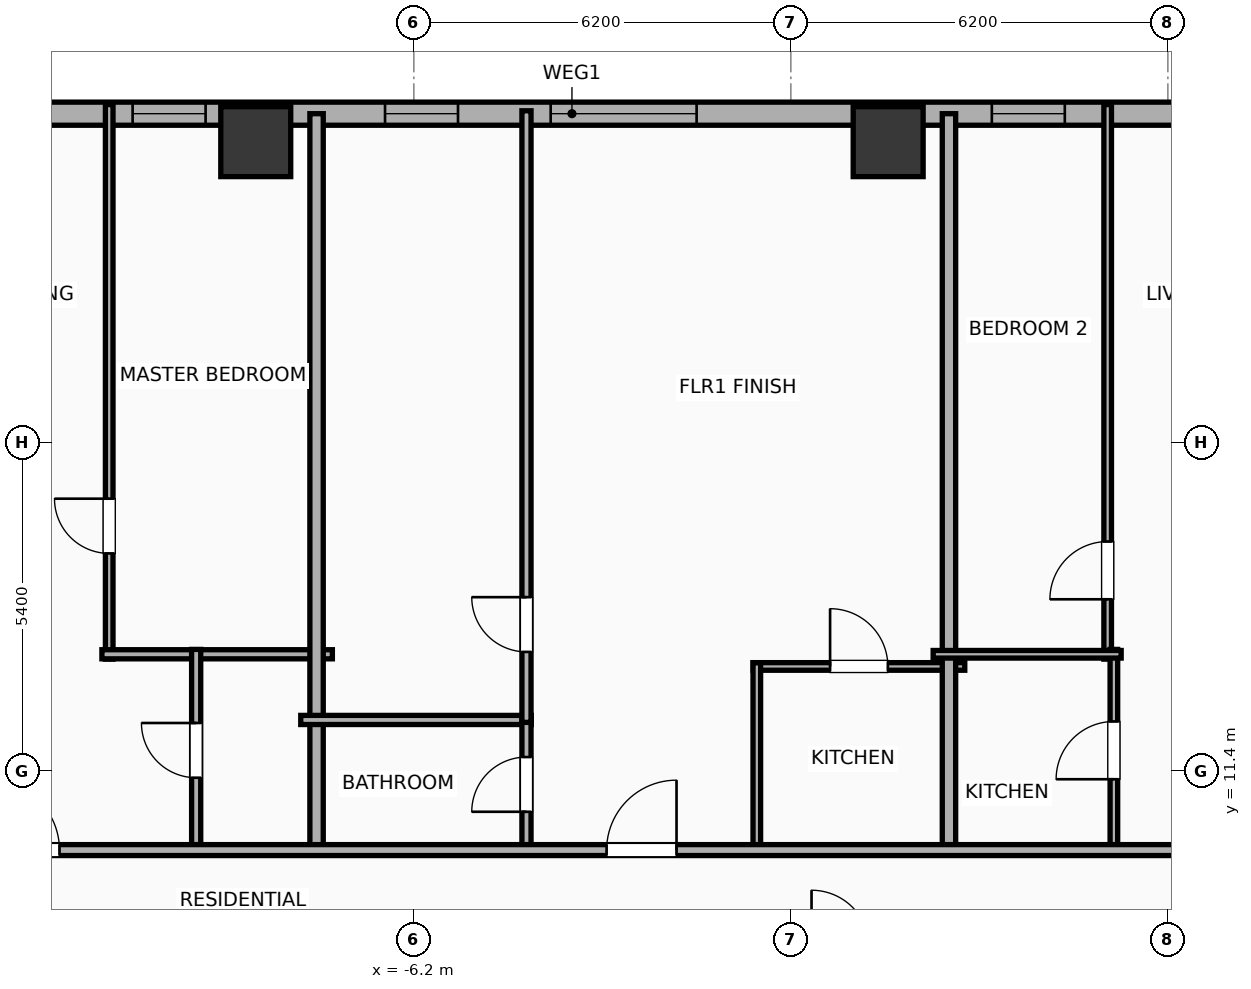
"""IFC4 building model, lengths in metres.
Left out: names, types, materials, properties, quantities, classifications, styles, units other than length and angle.
Written with IfcOpenShell. Run it as: python <this file> out.ifc"""

import sys

from ifc_helpers import new_model, si_unit, direction, frame, frame_2d, origin, origin_2d, place, context, subcontext, project, spatial, rectangle, hollow_rectangle, extrude, element, fill, save


model = new_model("IFC4")
c1 = context("Model", 3, precision=1e-05, world=origin(), true_north=direction((0.0, 1.0)))
c2 = subcontext(c1, "Body", "Model", "MODEL_VIEW")
j1 = project(units=[si_unit("LENGTHUNIT", "METRE"), si_unit("PLANEANGLEUNIT", "RADIAN")], contexts=[c1])
p1 = place(None, origin())
s1 = spatial("IfcSite", under=j1, at=p1, CompositionType="ELEMENT")
p2 = place(p1, origin())
s2 = spatial("IfcBuilding", under=s1, at=p2, CompositionType="ELEMENT")
p3 = place(p2, frame((0.0, 0.0, 41.6)))
s3 = spatial("IfcBuildingStorey", under=s2, at=p3, CompositionType="ELEMENT", Elevation=41.6)
for number, where, z_axis, x_axis in (
    (1, (1.6, 21.75, 0.0), (0.0, 0.0, 1.0), (1.0, 0.0, 0.0)),
    (2, (-8.8, 21.75, 0.0), (0.0, 0.0, 1.0), (1.0, 0.0, 0.0)),
):
    element("IfcColumn", number, at=place(p3, frame(where, z_axis=z_axis, x_axis=x_axis)), inside=s3, PredefinedType="COLUMN", context=c2, shape_type="SweptSolid", body=[
        extrude(hollow_rectangle(XDim=1.15, YDim=1.15, WallThickness=0.04, at=origin_2d()), origin(), (0.0, 0.0, 1.0), 3.9),
    ])
p4 = place(p3, frame((-29.581, 22.21, 0.0), z_axis=(0.0, 0.0, 1.0), x_axis=(1.0, 0.0, 0.0)))
e3 = element("IfcWall", 3, at=p4, inside=s3, PredefinedType="ELEMENTEDWALL", context=c2, shape_type="SweptSolid", body=[
    extrude(rectangle(XDim=51.963, YDim=0.38, at=frame_2d((25.981, 0.0))), origin(), (0.0, 0.0, 1.0), 3.65),
])
p5 = place(p4, frame((25.631, 0.0, 0.75)))
e4 = element("IfcOpeningElement", 4, at=p5, cuts=e3, PredefinedType="OPENING", context=c2, shape_type="SweptSolid", body=[
    extrude(rectangle(XDim=2.4, YDim=2.1, at=frame_2d((1.2, 1.05))), frame((0.0, 0.2, 0.0), z_axis=(0.0, -1.0, 0.0), x_axis=(1.0, 0.0, 0.0)), (0.0, 0.0, 1.0), 0.4),
])
p6 = place(p4, frame((42.952, 0.0, 0.75)))
e5 = element("IfcOpeningElement", 5, at=p6, cuts=e3, PredefinedType="OPENING", context=c2, shape_type="SweptSolid", body=[
    extrude(rectangle(XDim=2.4, YDim=2.1, at=frame_2d((1.2, 1.05))), frame((0.0, 0.2, 0.0), z_axis=(0.0, -1.0, 0.0), x_axis=(1.0, 0.0, 0.0)), (0.0, 0.0, 1.0), 0.4),
])
p7 = place(p4, frame((1.731, 0.0, 0.75)))
e6 = element("IfcOpeningElement", 6, at=p7, cuts=e3, PredefinedType="OPENING", context=c2, shape_type="SweptSolid", body=[
    extrude(rectangle(XDim=1.2, YDim=2.05, at=frame_2d((0.6, 1.025))), frame((0.0, 0.2, 0.0), z_axis=(0.0, -1.0, 0.0), x_axis=(1.0, 0.0, 0.0)), (0.0, 0.0, 1.0), 0.4),
])
p8 = place(p4, frame((5.272, 0.0, 0.75)))
e7 = element("IfcOpeningElement", 7, at=p8, cuts=e3, PredefinedType="OPENING", context=c2, shape_type="SweptSolid", body=[
    extrude(rectangle(XDim=1.2, YDim=2.05, at=frame_2d((0.6, 1.025))), frame((0.0, 0.2, 0.0), z_axis=(0.0, -1.0, 0.0), x_axis=(1.0, 0.0, 0.0)), (0.0, 0.0, 1.0), 0.4),
])
p9 = place(p4, frame((8.356, 0.0, 0.75)))
e8 = element("IfcOpeningElement", 8, at=p9, cuts=e3, PredefinedType="OPENING", context=c2, shape_type="SweptSolid", body=[
    extrude(rectangle(XDim=1.2, YDim=2.05, at=frame_2d((0.6, 1.025))), frame((0.0, 0.2, 0.0), z_axis=(0.0, -1.0, 0.0), x_axis=(1.0, 0.0, 0.0)), (0.0, 0.0, 1.0), 0.4),
])
p10 = place(p4, frame((15.632, 0.0, 0.75)))
e9 = element("IfcOpeningElement", 9, at=p10, cuts=e3, PredefinedType="OPENING", context=c2, shape_type="SweptSolid", body=[
    extrude(rectangle(XDim=1.2, YDim=2.05, at=frame_2d((0.6, 1.025))), frame((0.0, 0.2, 0.0), z_axis=(0.0, -1.0, 0.0), x_axis=(1.0, 0.0, 0.0)), (0.0, 0.0, 1.0), 0.4),
])
p11 = place(p4, frame((12.137, 0.0, 0.75)))
e10 = element("IfcOpeningElement", 10, at=p11, cuts=e3, PredefinedType="OPENING", context=c2, shape_type="SweptSolid", body=[
    extrude(rectangle(XDim=1.2, YDim=2.05, at=frame_2d((0.6, 1.025))), frame((0.0, 0.2, 0.0), z_axis=(0.0, -1.0, 0.0), x_axis=(1.0, 0.0, 0.0)), (0.0, 0.0, 1.0), 0.4),
])
p12 = place(p4, frame((18.756, 0.0, 0.75)))
e11 = element("IfcOpeningElement", 11, at=p12, cuts=e3, PredefinedType="OPENING", context=c2, shape_type="SweptSolid", body=[
    extrude(rectangle(XDim=1.2, YDim=2.05, at=frame_2d((0.6, 1.025))), frame((0.0, 0.2, 0.0), z_axis=(0.0, -1.0, 0.0), x_axis=(1.0, 0.0, 0.0)), (0.0, 0.0, 1.0), 0.4),
])
p13 = place(p4, frame((22.907, 0.0, 0.75)))
e12 = element("IfcOpeningElement", 12, at=p13, cuts=e3, PredefinedType="OPENING", context=c2, shape_type="SweptSolid", body=[
    extrude(rectangle(XDim=1.2, YDim=2.05, at=frame_2d((0.6, 1.025))), frame((0.0, 0.2, 0.0), z_axis=(0.0, -1.0, 0.0), x_axis=(1.0, 0.0, 0.0)), (0.0, 0.0, 1.0), 0.4),
])
p14 = place(p4, frame((36.381, 0.0, 0.75)))
e13 = element("IfcOpeningElement", 13, at=p14, cuts=e3, PredefinedType="OPENING", context=c2, shape_type="SweptSolid", body=[
    extrude(rectangle(XDim=1.2, YDim=2.05, at=frame_2d((0.6, 1.025))), frame((0.0, 0.2, 0.0), z_axis=(0.0, -1.0, 0.0), x_axis=(1.0, 0.0, 0.0)), (0.0, 0.0, 1.0), 0.4),
])
p15 = place(p4, frame((32.886, 0.0, 0.75)))
e14 = element("IfcOpeningElement", 14, at=p15, cuts=e3, PredefinedType="OPENING", context=c2, shape_type="SweptSolid", body=[
    extrude(rectangle(XDim=1.2, YDim=2.05, at=frame_2d((0.6, 1.025))), frame((0.0, 0.2, 0.0), z_axis=(0.0, -1.0, 0.0), x_axis=(1.0, 0.0, 0.0)), (0.0, 0.0, 1.0), 0.4),
])
p16 = place(p4, frame((39.556, 0.0, 0.75)))
e15 = element("IfcOpeningElement", 15, at=p16, cuts=e3, PredefinedType="OPENING", context=c2, shape_type="SweptSolid", body=[
    extrude(rectangle(XDim=1.2, YDim=2.05, at=frame_2d((0.6, 1.025))), frame((0.0, 0.2, 0.0), z_axis=(0.0, -1.0, 0.0), x_axis=(1.0, 0.0, 0.0)), (0.0, 0.0, 1.0), 0.4),
])
p17 = place(p4, frame((46.885, 0.0, 0.75)))
e16 = element("IfcOpeningElement", 16, at=p17, cuts=e3, PredefinedType="OPENING", context=c2, shape_type="SweptSolid", body=[
    extrude(rectangle(XDim=1.2, YDim=2.05, at=frame_2d((0.6, 1.025))), frame((0.0, 0.2, 0.0), z_axis=(0.0, -1.0, 0.0), x_axis=(1.0, 0.0, 0.0)), (0.0, 0.0, 1.0), 0.4),
])
p18 = place(p4, frame((49.531, 0.0, 0.75)))
e17 = element("IfcOpeningElement", 17, at=p18, cuts=e3, PredefinedType="OPENING", context=c2, shape_type="SweptSolid", body=[
    extrude(rectangle(XDim=1.2, YDim=2.05, at=frame_2d((0.6, 1.025))), frame((0.0, 0.2, 0.0), z_axis=(0.0, -1.0, 0.0), x_axis=(1.0, 0.0, 0.0)), (0.0, 0.0, 1.0), 0.4),
])
p19 = place(p3, frame((-11.21, 13.24, 0.0), z_axis=(0.0, 0.0, 1.0), x_axis=(0.0, 1.0, 0.0)))
e18 = element("IfcWall", 18, at=p19, inside=s3, PredefinedType="PARTITIONING", context=c2, shape_type="SweptSolid", body=[
    extrude(rectangle(XDim=9.12, YDim=0.125, at=frame_2d((4.56, 0.0))), origin(), (0.0, 0.0, 1.0), 3.65),
])
p20 = place(p19, frame((1.739, 0.0, 0.0)))
e19 = element("IfcOpeningElement", 19, at=p20, cuts=e18, PredefinedType="OPENING", context=c2, shape_type="SweptSolid", body=[
    extrude(rectangle(XDim=0.9, YDim=2.05, at=frame_2d((0.45, 1.025))), frame((0.0, 0.073, 0.0), z_axis=(0.0, -1.0, 0.0), x_axis=(1.0, 0.0, 0.0)), (0.0, 0.0, 1.0), 0.145),
])
p21 = place(p3, frame((-11.33, 13.32, 0.0), z_axis=(0.0, 0.0, 1.0), x_axis=(1.0, 0.0, 0.0)))
e20 = element("IfcWall", 20, at=p21, inside=s3, PredefinedType="PLUMBINGWALL", context=c2, shape_type="SweptSolid", body=[
    extrude(rectangle(XDim=3.79, YDim=0.15, at=frame_2d((1.895, 0.0))), origin(), (0.0, 0.0, 1.0), 3.65),
])
p22 = place(p3, frame((-9.78, 10.08, 0.0), z_axis=(0.0, 0.0, 1.0), x_axis=(0.0, 1.0, 0.0)))
e21 = element("IfcWall", 21, at=p22, inside=s3, PredefinedType="PLUMBINGWALL", context=c2, shape_type="SweptSolid", body=[
    extrude(rectangle(XDim=3.32, YDim=0.15, at=frame_2d((1.66, 0.0))), origin(), (0.0, 0.0, 1.0), 3.65),
])
p23 = place(p22, frame((1.21, 0.0, 0.0)))
e22 = element("IfcOpeningElement", 22, at=p23, cuts=e21, PredefinedType="OPENING", context=c2, shape_type="SweptSolid", body=[
    extrude(rectangle(XDim=0.9, YDim=2.05, at=frame_2d((0.45, 1.025))), frame((0.0, 0.085, 0.0), z_axis=(0.0, -1.0, 0.0), x_axis=(1.0, 0.0, 0.0)), (0.0, 0.0, 1.0), 0.17),
])
p24 = place(p3, frame((-7.8, 10.02, 0.0), z_axis=(0.0, 0.0, 1.0), x_axis=(0.0, 1.0, 0.0)))
e23 = element("IfcWall", 23, at=p24, inside=s3, PredefinedType="PARTITIONING", context=c2, shape_type="SweptSolid", body=[
    extrude(rectangle(XDim=12.19, YDim=0.22, at=frame_2d((6.095, 0.0))), origin(), (0.0, 0.0, 1.0), 3.65),
])
p25 = place(p3, frame((-8.06, 12.24, 0.0), z_axis=(0.0, 0.0, 1.0), x_axis=(1.0, 0.0, 0.0)))
e24 = element("IfcWall", 24, at=p25, inside=s3, PredefinedType="PLUMBINGWALL", context=c2, shape_type="SweptSolid", body=[
    extrude(rectangle(XDim=3.792, YDim=0.15, at=frame_2d((1.896, 0.0))), origin(), (0.0, 0.0, 1.0), 3.65),
])
p26 = place(p3, frame((-4.348, 10.08, 0.0), z_axis=(0.0, 0.0, 1.0), x_axis=(0.0, 1.0, 0.0)))
e25 = element("IfcWall", 25, at=p26, inside=s3, PredefinedType="PLUMBINGWALL", context=c2, shape_type="SweptSolid", body=[
    extrude(rectangle(XDim=2.2, YDim=0.15, at=frame_2d((1.1, 0.0))), origin(), (0.0, 0.0, 1.0), 3.65),
])
p27 = place(p26, frame((0.65, 0.0, 0.0)))
e26 = element("IfcOpeningElement", 26, at=p27, cuts=e25, PredefinedType="OPENING", context=c2, shape_type="SweptSolid", body=[
    extrude(rectangle(XDim=0.9, YDim=2.05, at=frame_2d((0.45, 1.025))), frame((0.0, 0.085, 0.0), z_axis=(0.0, -1.0, 0.0), x_axis=(1.0, 0.0, 0.0)), (0.0, 0.0, 1.0), 0.17),
])
p28 = place(p3, frame((-4.348, 12.2, 0.0), z_axis=(0.0, 0.0, 1.0), x_axis=(0.0, 1.0, 0.0)))
e27 = element("IfcWall", 27, at=p28, inside=s3, PredefinedType="PLUMBINGWALL", context=c2, shape_type="SweptSolid", body=[
    extrude(rectangle(XDim=10.058, YDim=0.15, at=frame_2d((5.029, 0.0))), origin(), (0.0, 0.0, 1.0), 3.65),
])
p29 = place(p28, frame((1.159, 0.0, 0.0)))
e28 = element("IfcOpeningElement", 28, at=p29, cuts=e27, PredefinedType="OPENING", context=c2, shape_type="SweptSolid", body=[
    extrude(rectangle(XDim=0.9, YDim=2.05, at=frame_2d((0.45, 1.025))), frame((0.0, 0.085, 0.0), z_axis=(0.0, -1.0, 0.0), x_axis=(1.0, 0.0, 0.0)), (0.0, 0.0, 1.0), 0.17),
])
p30 = place(p3, frame((-0.62, 13.12, 0.0), z_axis=(0.0, 0.0, 1.0), x_axis=(1.0, 0.0, 0.0)))
e29 = element("IfcWall", 29, at=p30, inside=s3, PredefinedType="PARTITIONING", context=c2, shape_type="SweptSolid", body=[
    extrude(rectangle(XDim=3.48, YDim=0.125, at=frame_2d((1.74, 0.0))), origin(), (0.0, 0.0, 1.0), 3.65),
])
p31 = place(p30, frame((1.265, 0.0, 0.0)))
e30 = element("IfcOpeningElement", 30, at=p31, cuts=e29, PredefinedType="OPENING", context=c2, shape_type="SweptSolid", body=[
    extrude(rectangle(XDim=0.95, YDim=2.05, at=frame_2d((0.475, 1.025))), frame((0.0, 0.073, 0.0), z_axis=(0.0, -1.0, 0.0), x_axis=(1.0, 0.0, 0.0)), (0.0, 0.0, 1.0), 0.145),
])
p32 = place(p3, frame((-0.56, 10.08, 0.0), z_axis=(0.0, 0.0, 1.0), x_axis=(0.0, 1.0, 0.0)))
e31 = element("IfcWall", 31, at=p32, inside=s3, PredefinedType="PARTITIONING", context=c2, shape_type="SweptSolid", body=[
    extrude(rectangle(XDim=3.1, YDim=0.125, at=frame_2d((1.55, 0.0))), origin(), (0.0, 0.0, 1.0), 3.65),
])
p33 = place(p3, frame((2.6, 10.02, 0.0), z_axis=(0.0, 0.0, 1.0), x_axis=(0.0, 1.0, 0.0)))
e32 = element("IfcWall", 32, at=p33, inside=s3, PredefinedType="PARTITIONING", context=c2, shape_type="SweptSolid", body=[
    extrude(rectangle(XDim=12.19, YDim=0.22, at=frame_2d((6.095, 0.0))), origin(), (0.0, 0.0, 1.0), 2.94),
])
p34 = place(p3, frame((5.21, 13.24, 0.0), z_axis=(0.0, 0.0, 1.0), x_axis=(0.0, 1.0, 0.0)))
e33 = element("IfcWall", 33, at=p34, inside=s3, PredefinedType="PARTITIONING", context=c2, shape_type="SweptSolid", body=[
    extrude(rectangle(XDim=9.12, YDim=0.125, at=frame_2d((4.56, 0.0))), origin(), (0.0, 0.0, 1.0), 3.65),
])
p35 = place(p34, frame((0.984, 0.0, 0.0)))
e34 = element("IfcOpeningElement", 34, at=p35, cuts=e33, PredefinedType="OPENING", context=c2, shape_type="SweptSolid", body=[
    extrude(rectangle(XDim=0.95, YDim=2.05, at=frame_2d((0.475, 1.025))), frame((0.0, 0.073, 0.0), z_axis=(0.0, -1.0, 0.0), x_axis=(1.0, 0.0, 0.0)), (0.0, 0.0, 1.0), 0.145),
])
p36 = place(p3, frame((5.312, 10.08, 0.0), z_axis=(0.0, 0.0, 1.0), x_axis=(0.0, 1.0, 0.0)))
e35 = element("IfcWall", 35, at=p36, inside=s3, PredefinedType="PARTITIONING", context=c2, shape_type="SweptSolid", body=[
    extrude(rectangle(XDim=3.32, YDim=0.125, at=frame_2d((1.66, 0.0))), origin(), (0.0, 0.0, 1.0), 3.65),
])
p37 = place(p36, frame((1.185, 0.0, 0.0)))
e36 = element("IfcOpeningElement", 36, at=p37, cuts=e35, PredefinedType="OPENING", context=c2, shape_type="SweptSolid", body=[
    extrude(rectangle(XDim=0.95, YDim=2.05, at=frame_2d((0.475, 1.025))), frame((0.0, 0.073, 0.0), z_axis=(0.0, -1.0, 0.0), x_axis=(1.0, 0.0, 0.0)), (0.0, 0.0, 1.0), 0.145),
])
p38 = place(p3, frame((2.34, 13.32, 0.0), z_axis=(0.0, 0.0, 1.0), x_axis=(1.0, 0.0, 0.0)))
e37 = element("IfcWall", 37, at=p38, inside=s3, PredefinedType="PARTITIONING", context=c2, shape_type="SweptSolid", body=[
    extrude(rectangle(XDim=3.092, YDim=0.125, at=frame_2d((1.546, 0.0))), origin(), (0.0, 0.0, 1.0), 3.65),
])
p39 = place(p3, frame((-33.41, 10.1, 0.0), z_axis=(0.0, 0.0, 1.0), x_axis=(1.0, 0.0, 0.0)))
e38 = element("IfcWall", 38, at=p39, inside=s3, PredefinedType="PARTITIONING", context=c2, shape_type="SweptSolid", body=[
    extrude(rectangle(XDim=59.62, YDim=0.18, at=frame_2d((29.81, 0.0))), origin(), (0.0, 0.0, 1.0), 3.65),
])
p40 = place(p39, frame((3.354, 0.0, 0.0)))
e39 = element("IfcOpeningElement", 39, at=p40, cuts=e38, PredefinedType="OPENING", context=c2, shape_type="SweptSolid", body=[
    extrude(rectangle(XDim=1.15, YDim=2.05, at=frame_2d((0.575, 1.025))), frame((0.0, 0.1, 0.0), z_axis=(0.0, -1.0, 0.0), x_axis=(1.0, 0.0, 0.0)), (0.0, 0.0, 1.0), 0.2),
])
p41 = place(p39, frame((10.997, 0.0, 0.0)))
e40 = element("IfcOpeningElement", 40, at=p41, cuts=e38, PredefinedType="OPENING", context=c2, shape_type="SweptSolid", body=[
    extrude(rectangle(XDim=1.15, YDim=2.05, at=frame_2d((0.575, 1.025))), frame((0.0, 0.1, 0.0), z_axis=(0.0, -1.0, 0.0), x_axis=(1.0, 0.0, 0.0)), (0.0, 0.0, 1.0), 0.2),
])
p42 = place(p39, frame((20.232, 0.0, 0.0)))
e41 = element("IfcOpeningElement", 41, at=p42, cuts=e38, PredefinedType="OPENING", context=c2, shape_type="SweptSolid", body=[
    extrude(rectangle(XDim=1.15, YDim=2.05, at=frame_2d((0.575, 1.025))), frame((0.0, 0.1, 0.0), z_axis=(0.0, -1.0, 0.0), x_axis=(1.0, 0.0, 0.0)), (0.0, 0.0, 1.0), 0.2),
])
p43 = place(p39, frame((30.38, 0.0, 0.0)))
e42 = element("IfcOpeningElement", 42, at=p43, cuts=e38, PredefinedType="OPENING", context=c2, shape_type="SweptSolid", body=[
    extrude(rectangle(XDim=1.15, YDim=2.05, at=frame_2d((0.575, 1.025))), frame((0.0, 0.1, 0.0), z_axis=(0.0, -1.0, 0.0), x_axis=(1.0, 0.0, 0.0)), (0.0, 0.0, 1.0), 0.2),
])
p44 = place(p39, frame((40.998, 0.0, 0.0)))
e43 = element("IfcOpeningElement", 43, at=p44, cuts=e38, PredefinedType="OPENING", context=c2, shape_type="SweptSolid", body=[
    extrude(rectangle(XDim=1.15, YDim=2.05, at=frame_2d((0.575, 1.025))), frame((0.0, 0.1, 0.0), z_axis=(0.0, -1.0, 0.0), x_axis=(1.0, 0.0, 0.0)), (0.0, 0.0, 1.0), 0.2),
])
p45 = place(p39, frame((49.428, 0.0, 0.0)))
e44 = element("IfcOpeningElement", 44, at=p45, cuts=e38, PredefinedType="OPENING", context=c2, shape_type="SweptSolid", body=[
    extrude(rectangle(XDim=0.9, YDim=2.05, at=frame_2d((0.45, 1.025))), frame((0.0, 0.1, 0.0), z_axis=(0.0, -1.0, 0.0), x_axis=(1.0, 0.0, 0.0)), (0.0, 0.0, 1.0), 0.2),
])
p46 = place(p39, frame((56.07, 0.0, 0.0)))
e45 = element("IfcOpeningElement", 45, at=p46, cuts=e38, PredefinedType="OPENING", context=c2, shape_type="SweptSolid", body=[
    extrude(rectangle(XDim=0.9, YDim=2.05, at=frame_2d((0.45, 1.025))), frame((0.0, 0.1, 0.0), z_axis=(0.0, -1.0, 0.0), x_axis=(1.0, 0.0, 0.0)), (0.0, 0.0, 1.0), 0.2),
])
p47 = place(p5, origin())
e46 = element("IfcWindow", 46, at=p47, inside=s3, PartitioningType="SINGLE_PANEL", PredefinedType="WINDOW", context=c2, shape_type="SweptSolid", body=[
    extrude(rectangle(XDim=2.4, YDim=2.1, at=frame_2d((1.2, 1.05))), frame((0.0, 0.03, 0.0), z_axis=(0.0, -1.0, 0.0), x_axis=(1.0, 0.0, 0.0)), (0.0, 0.0, 1.0), 0.06),
])
fill(e4, e46)
p48 = place(p12, origin())
e47 = element("IfcWindow", 47, at=p48, inside=s3, PartitioningType="SINGLE_PANEL", PredefinedType="WINDOW", context=c2, shape_type="SweptSolid", body=[
    extrude(rectangle(XDim=1.2, YDim=2.05, at=frame_2d((0.6, 1.025))), frame((0.0, 0.03, 0.0), z_axis=(0.0, -1.0, 0.0), x_axis=(1.0, 0.0, 0.0)), (0.0, 0.0, 1.0), 0.06),
])
fill(e11, e47)
p49 = place(p13, origin())
e48 = element("IfcWindow", 48, at=p49, inside=s3, PartitioningType="SINGLE_PANEL", PredefinedType="WINDOW", context=c2, shape_type="SweptSolid", body=[
    extrude(rectangle(XDim=1.2, YDim=2.05, at=frame_2d((0.6, 1.025))), frame((0.0, 0.03, 0.0), z_axis=(0.0, -1.0, 0.0), x_axis=(1.0, 0.0, 0.0)), (0.0, 0.0, 1.0), 0.06),
])
fill(e12, e48)
p50 = place(p15, origin())
e49 = element("IfcWindow", 49, at=p50, inside=s3, PartitioningType="SINGLE_PANEL", PredefinedType="WINDOW", context=c2, shape_type="SweptSolid", body=[
    extrude(rectangle(XDim=1.2, YDim=2.05, at=frame_2d((0.6, 1.025))), frame((0.0, 0.03, 0.0), z_axis=(0.0, -1.0, 0.0), x_axis=(1.0, 0.0, 0.0)), (0.0, 0.0, 1.0), 0.06),
])
fill(e14, e49)
p51 = place(p20, origin())
e50 = element("IfcDoor", 50, at=p51, inside=s3, OperationType="SINGLE_SWING_RIGHT", PredefinedType="DOOR", context=c2, shape_type="SweptSolid", body=[
    extrude(rectangle(XDim=0.9, YDim=2.05, at=frame_2d((0.45, 1.025))), frame((0.0, 0.025, 0.0), z_axis=(0.0, -1.0, 0.0), x_axis=(1.0, 0.0, 0.0)), (0.0, 0.0, 1.0), 0.05),
])
fill(e19, e50)
p52 = place(p23, origin())
e51 = element("IfcDoor", 51, at=p52, inside=s3, OperationType="SINGLE_SWING_RIGHT", PredefinedType="DOOR", context=c2, shape_type="SweptSolid", body=[
    extrude(rectangle(XDim=0.9, YDim=2.05, at=frame_2d((0.45, 1.025))), frame((0.0, 0.025, 0.0), z_axis=(0.0, -1.0, 0.0), x_axis=(1.0, 0.0, 0.0)), (0.0, 0.0, 1.0), 0.05),
])
fill(e22, e51)
p53 = place(p27, origin())
e52 = element("IfcDoor", 52, at=p53, inside=s3, OperationType="SINGLE_SWING_LEFT", PredefinedType="DOOR", context=c2, shape_type="SweptSolid", body=[
    extrude(rectangle(XDim=0.9, YDim=2.05, at=frame_2d((0.45, 1.025))), frame((0.0, 0.025, 0.0), z_axis=(0.0, -1.0, 0.0), x_axis=(1.0, 0.0, 0.0)), (0.0, 0.0, 1.0), 0.05),
])
fill(e26, e52)
p54 = place(p29, origin())
e53 = element("IfcDoor", 53, at=p54, inside=s3, OperationType="SINGLE_SWING_RIGHT", PredefinedType="DOOR", context=c2, shape_type="SweptSolid", body=[
    extrude(rectangle(XDim=0.9, YDim=2.05, at=frame_2d((0.45, 1.025))), frame((0.0, 0.025, 0.0), z_axis=(0.0, -1.0, 0.0), x_axis=(1.0, 0.0, 0.0)), (0.0, 0.0, 1.0), 0.05),
])
fill(e28, e53)
p55 = place(p31, origin())
e54 = element("IfcDoor", 54, at=p55, inside=s3, OperationType="SINGLE_SWING_LEFT", PredefinedType="DOOR", context=c2, shape_type="SweptSolid", body=[
    extrude(rectangle(XDim=0.95, YDim=2.05, at=frame_2d((0.475, 1.025))), frame((0.0, 0.025, 0.0), z_axis=(0.0, -1.0, 0.0), x_axis=(1.0, 0.0, 0.0)), (0.0, 0.0, 1.0), 0.05),
])
fill(e30, e54)
p56 = place(p35, origin())
e55 = element("IfcDoor", 55, at=p56, inside=s3, OperationType="SINGLE_SWING_LEFT", PredefinedType="DOOR", context=c2, shape_type="SweptSolid", body=[
    extrude(rectangle(XDim=0.95, YDim=2.05, at=frame_2d((0.475, 1.025))), frame((0.0, 0.025, 0.0), z_axis=(0.0, -1.0, 0.0), x_axis=(1.0, 0.0, 0.0)), (0.0, 0.0, 1.0), 0.05),
])
fill(e34, e55)
p57 = place(p37, origin())
e56 = element("IfcDoor", 56, at=p57, inside=s3, OperationType="SINGLE_SWING_LEFT", PredefinedType="DOOR", context=c2, shape_type="SweptSolid", body=[
    extrude(rectangle(XDim=0.95, YDim=2.05, at=frame_2d((0.475, 1.025))), frame((0.0, 0.025, 0.0), z_axis=(0.0, -1.0, 0.0), x_axis=(1.0, 0.0, 0.0)), (0.0, 0.0, 1.0), 0.05),
])
fill(e36, e56)
p58 = place(p42, origin())
e57 = element("IfcDoor", 57, at=p58, inside=s3, OperationType="SINGLE_SWING_LEFT", PredefinedType="DOOR", context=c2, shape_type="SweptSolid", body=[
    extrude(rectangle(XDim=1.15, YDim=2.05, at=frame_2d((0.575, 1.025))), frame((0.0, 0.025, 0.0), z_axis=(0.0, -1.0, 0.0), x_axis=(1.0, 0.0, 0.0)), (0.0, 0.0, 1.0), 0.05),
])
fill(e41, e57)
p59 = place(p43, origin())
e58 = element("IfcDoor", 58, at=p59, inside=s3, OperationType="SINGLE_SWING_RIGHT", PredefinedType="DOOR", context=c2, shape_type="SweptSolid", body=[
    extrude(rectangle(XDim=1.15, YDim=2.05, at=frame_2d((0.575, 1.025))), frame((0.0, 0.025, 0.0), z_axis=(0.0, -1.0, 0.0), x_axis=(1.0, 0.0, 0.0)), (0.0, 0.0, 1.0), 0.05),
])
fill(e42, e58)
save(model, sys.argv[1])
